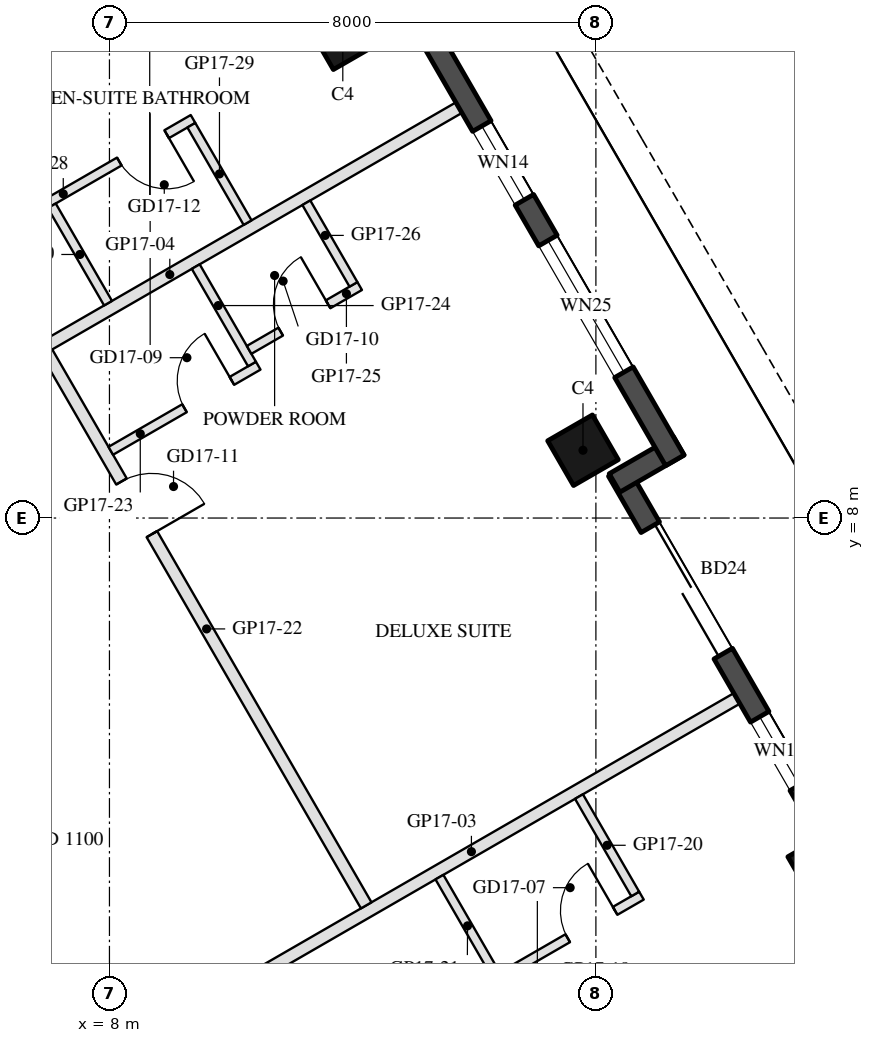
"""IFC4 building model, lengths in metres.
Left out: names, types, materials, properties, quantities, classifications, styles, units other than length and angle.
Written with IfcOpenShell. Run it as: python <this file> out.ifc"""

import sys

from ifc_helpers import new_model, si_unit, direction, frame, frame_2d, origin, origin_2d, place, context, subcontext, project, spatial, rectangle, hollow_rectangle, extrude, element, fill, save


model = new_model("IFC4")
c1 = context("Model", 3, precision=1e-05, world=origin(), true_north=direction((0.0, 1.0)))
c2 = subcontext(c1, "Body", "Model", "MODEL_VIEW")
j1 = project(units=[si_unit("LENGTHUNIT", "METRE"), si_unit("PLANEANGLEUNIT", "RADIAN")], contexts=[c1])
p1 = place(None, origin())
s1 = spatial("IfcSite", under=j1, at=p1, CompositionType="ELEMENT")
p2 = place(p1, origin())
s2 = spatial("IfcBuilding", under=s1, at=p2, CompositionType="ELEMENT")
p3 = place(p2, frame((0.0, 0.0, 183.6)))
s3 = spatial("IfcBuildingStorey", under=s2, at=p3, CompositionType="ELEMENT", Elevation=183.6)
for number, where, z_axis, x_axis in (
    (1, (19.738, 2.273, 0.0), (0.0, 0.0, 1.0), (-0.5, 0.866, 0.0)),
    (2, (15.788, 9.115, 0.0), (0.0, 0.0, 1.0), (-0.5, 0.866, 0.0)),
    (3, (11.838, 15.957, 0.0), (0.0, 0.0, 1.0), (-0.5, 0.866, 0.0)),
):
    element("IfcColumn", number, at=place(p3, frame(where, z_axis=z_axis, x_axis=x_axis)), inside=s3, PredefinedType="COLUMN", context=c2, shape_type="SweptSolid", body=[
        extrude(hollow_rectangle(XDim=0.85, YDim=0.85, WallThickness=0.04, at=origin_2d()), origin(), (0.0, 0.0, 1.0), 3.7),
    ])
p4 = place(p3, frame((19.729, 2.938, 0.0), z_axis=(0.0, 0.0, 1.0), x_axis=(-0.499976430342, 0.866039011305, 0.0)))
e4 = element("IfcWall", 4, at=p4, inside=s3, PredefinedType="SOLIDWALL", context=c2, shape_type="SweptSolid", body=[
    extrude(rectangle(XDim=6.74, YDim=0.35, at=frame_2d((3.37, 0.0))), origin(), (0.0, 0.0, 1.0), 3.55),
])
p5 = place(p4, frame((0.77, 0.0, 0.3)))
e5 = element("IfcOpeningElement", 5, at=p5, cuts=e4, PredefinedType="OPENING", context=c2, shape_type="SweptSolid", body=[
    extrude(rectangle(XDim=1.3, YDim=2.65, at=frame_2d((0.65, 1.325))), frame((0.0, 0.185, 0.0), z_axis=(0.0, -1.0, 0.0), x_axis=(1.0, 0.0, 0.0)), (0.0, 0.0, 1.0), 0.37),
])
p6 = place(p4, frame((3.27, 0.0, 0.0)))
e6 = element("IfcOpeningElement", 6, at=p6, cuts=e4, PredefinedType="OPENING", context=c2, shape_type="SweptSolid", body=[
    extrude(rectangle(XDim=2.4, YDim=2.4, at=frame_2d((1.2, 1.2))), frame((0.0, 0.185, 0.0), z_axis=(0.0, -1.0, 0.0), x_axis=(1.0, 0.0, 0.0)), (0.0, 0.0, 1.0), 0.37),
])
p7 = place(p3, frame((16.306, 8.577, 0.0), z_axis=(0.0, 0.0, 1.0), x_axis=(0.866092288191, 0.499884134912, 0.0)))
e7 = element("IfcWall", 7, at=p7, inside=s3, PredefinedType="SOLIDWALL", context=c2, shape_type="SweptSolid", body=[
    extrude(rectangle(XDim=1.22, YDim=0.35, at=frame_2d((0.61, 0.0))), origin(), (0.0, 0.0, 1.0), 3.55),
])
p8 = place(p3, frame((17.299, 8.948, 0.0), z_axis=(0.0, 0.0, 1.0), x_axis=(-0.500010041276, 0.866019606374, 0.0)))
e8 = element("IfcWall", 8, at=p8, inside=s3, PredefinedType="SOLIDWALL", context=c2, shape_type="SweptSolid", body=[
    extrude(rectangle(XDim=9.7, YDim=0.35, at=frame_2d((4.85, 0.0))), origin(), (0.0, 0.0, 1.0), 3.55),
])
p9 = place(p8, frame((1.675, 0.0, 0.3)))
e9 = element("IfcOpeningElement", 9, at=p9, cuts=e8, PredefinedType="OPENING", context=c2, shape_type="SweptSolid", body=[
    extrude(rectangle(XDim=2.5, YDim=2.65, at=frame_2d((1.25, 1.325))), frame((0.0, 0.185, 0.0), z_axis=(0.0, -1.0, 0.0), x_axis=(1.0, 0.0, 0.0)), (0.0, 0.0, 1.0), 0.37),
])
p10 = place(p8, frame((4.949, 0.0, 0.3)))
e10 = element("IfcOpeningElement", 10, at=p10, cuts=e8, PredefinedType="OPENING", context=c2, shape_type="SweptSolid", body=[
    extrude(rectangle(XDim=1.4, YDim=2.65, at=frame_2d((0.7, 1.325))), frame((0.0, 0.185, 0.0), z_axis=(0.0, -1.0, 0.0), x_axis=(1.0, 0.0, 0.0)), (0.0, 0.0, 1.0), 0.37),
])
p11 = place(p3, frame((18.318, 5.033, 0.0), z_axis=(0.0, 0.0, 1.0), x_axis=(-0.866028692387, -0.49999430393, 0.0)))
e11 = element("IfcWall", 11, at=p11, inside=s3, PredefinedType="PARTITIONING", context=c2, shape_type="SweptSolid", body=[
    extrude(rectangle(XDim=10.08, YDim=0.2, at=frame_2d((5.04, 0.0))), origin(), (0.0, 0.0, 1.0), 3.06),
])
p12 = place(p3, frame((13.747, 14.75, 0.0), z_axis=(0.0, 0.0, 1.0), x_axis=(-0.866027479907, -0.499996404033, 0.0)))
e12 = element("IfcWall", 12, at=p12, inside=s3, PredefinedType="PARTITIONING", context=c2, shape_type="SweptSolid", body=[
    extrude(rectangle(XDim=10.98, YDim=0.2, at=frame_2d((5.49, 0.0))), origin(), (0.0, 0.0, 1.0), 3.06),
])
p13 = place(p3, frame((14.324, 0.389, 0.0), z_axis=(0.0, 0.0, 1.0), x_axis=(0.866034573852, 0.49998411664, 0.0)))
e13 = element("IfcWall", 13, at=p13, inside=s3, PredefinedType="PARTITIONING", context=c2, shape_type="SweptSolid", body=[
    extrude(rectangle(XDim=2.8, YDim=0.15, at=frame_2d((1.4, 0.0))), origin(), (0.0, 0.0, 1.0), 3.55),
])
p14 = place(p13, frame((1.4, 0.0, 0.0)))
e14 = element("IfcOpeningElement", 14, at=p14, cuts=e13, PredefinedType="OPENING", context=c2, shape_type="SweptSolid", body=[
    extrude(rectangle(XDim=0.9, YDim=2.1, at=frame_2d((0.45, 1.05))), frame((0.0, 0.085, 0.0), z_axis=(0.0, -1.0, 0.0), x_axis=(1.0, 0.0, 0.0)), (0.0, 0.0, 1.0), 0.17),
])
p15 = place(p3, frame((16.647, 1.817, 0.0), z_axis=(0.0, 0.0, 1.0), x_axis=(-0.500042316284, 0.866000971088, 0.0)))
e15 = element("IfcWall", 15, at=p15, inside=s3, PredefinedType="PARTITIONING", context=c2, shape_type="SweptSolid", body=[
    extrude(rectangle(XDim=1.85, YDim=0.15, at=frame_2d((0.925, 0.0))), origin(), (0.0, 0.0, 1.0), 3.55),
])
p16 = place(p3, frame((14.352, 0.492, 0.0), z_axis=(0.0, 0.0, 1.0), x_axis=(-0.499886193382, 0.866091100096, 0.0)))
e16 = element("IfcWall", 16, at=p16, inside=s3, PredefinedType="PARTITIONING", context=c2, shape_type="SweptSolid", body=[
    extrude(rectangle(XDim=1.85, YDim=0.15, at=frame_2d((0.925, 0.0))), origin(), (0.0, 0.0, 1.0), 3.55),
])
p17 = place(p3, frame((6.973, 10.723, 0.0), z_axis=(0.0, 0.0, 1.0), x_axis=(0.500000207062, -0.866025284237, 0.0)))
e17 = element("IfcWall", 17, at=p17, inside=s3, PredefinedType="PARTITIONING", context=c2, shape_type="SweptSolid", body=[
    extrude(rectangle(XDim=10.5, YDim=0.2, at=frame_2d((5.25, 0.0))), origin(), (0.0, 0.0, 1.0), 2.95),
])
p18 = place(p17, frame((2.45, 0.0, 0.0)))
e18 = element("IfcOpeningElement", 18, at=p18, cuts=e17, PredefinedType="OPENING", context=c2, shape_type="SweptSolid", body=[
    extrude(rectangle(XDim=1.0, YDim=2.1, at=frame_2d((0.5, 1.05))), frame((0.0, 0.11, 0.0), z_axis=(0.0, -1.0, 0.0), x_axis=(1.0, 0.0, 0.0)), (0.0, 0.0, 1.0), 0.22),
])
p19 = place(p3, frame((8.022, 9.106, 0.0), z_axis=(0.0, 0.0, 1.0), x_axis=(0.866018616679, 0.500011755427, 0.0)))
e19 = element("IfcWall", 19, at=p19, inside=s3, PredefinedType="PARTITIONING", context=c2, shape_type="SweptSolid", body=[
    extrude(rectangle(XDim=2.8, YDim=0.15, at=frame_2d((1.4, 0.0))), origin(), (0.0, 0.0, 1.0), 2.95),
])
p20 = place(p19, frame((1.4, 0.0, 0.0)))
e20 = element("IfcOpeningElement", 20, at=p20, cuts=e19, PredefinedType="OPENING", context=c2, shape_type="SweptSolid", body=[
    extrude(rectangle(XDim=0.9, YDim=2.1, at=frame_2d((0.45, 1.05))), frame((0.0, 0.085, 0.0), z_axis=(0.0, -1.0, 0.0), x_axis=(1.0, 0.0, 0.0)), (0.0, 0.0, 1.0), 0.17),
])
p21 = place(p3, frame((10.344, 10.533, 0.0), z_axis=(0.0, 0.0, 1.0), x_axis=(-0.499985172903, 0.866033964044, 0.0)))
e21 = element("IfcWall", 21, at=p21, inside=s3, PredefinedType="PARTITIONING", context=c2, shape_type="SweptSolid", body=[
    extrude(rectangle(XDim=1.85, YDim=0.15, at=frame_2d((0.925, 0.0))), origin(), (0.0, 0.0, 1.0), 2.95),
])
p22 = place(p3, frame((10.297, 10.766, 0.0), z_axis=(0.0, 0.0, 1.0), x_axis=(0.866009402589, 0.500027713859, 0.0)))
e22 = element("IfcWall", 22, at=p22, inside=s3, PredefinedType="PARTITIONING", context=c2, shape_type="SweptSolid", body=[
    extrude(rectangle(XDim=2.1, YDim=0.15, at=frame_2d((1.05, 0.0))), origin(), (0.0, 0.0, 1.0), 3.55),
])
p23 = place(p22, frame((0.6, 0.0, 0.0)))
e23 = element("IfcOpeningElement", 23, at=p23, cuts=e22, PredefinedType="OPENING", context=c2, shape_type="SweptSolid", body=[
    extrude(rectangle(XDim=0.9, YDim=2.1, at=frame_2d((0.45, 1.05))), frame((0.0, 0.085, 0.0), z_axis=(0.0, -1.0, 0.0), x_axis=(1.0, 0.0, 0.0)), (0.0, 0.0, 1.0), 0.17),
])
p24 = place(p3, frame((12.013, 11.843, 0.0), z_axis=(0.0, 0.0, 1.0), x_axis=(-0.500086022567, 0.865975732936, 0.0)))
e24 = element("IfcWall", 24, at=p24, inside=s3, PredefinedType="PARTITIONING", context=c2, shape_type="SweptSolid", body=[
    extrude(rectangle(XDim=1.55, YDim=0.15, at=frame_2d((0.775, 0.0))), origin(), (0.0, 0.0, 1.0), 3.55),
])
p25 = place(p3, frame((9.374, 14.563, 0.0), z_axis=(0.0, 0.0, 1.0), x_axis=(-0.866034573852, -0.49998411664, 0.0)))
e25 = element("IfcWall", 25, at=p25, inside=s3, PredefinedType="PARTITIONING", context=c2, shape_type="SweptSolid", body=[
    extrude(rectangle(XDim=2.8, YDim=0.15, at=frame_2d((1.4, 0.0))), origin(), (0.0, 0.0, 1.0), 2.95),
])
p26 = place(p25, frame((0.5, 0.0, 0.0)))
e26 = element("IfcOpeningElement", 26, at=p26, cuts=e25, PredefinedType="OPENING", context=c2, shape_type="SweptSolid", body=[
    extrude(rectangle(XDim=0.9, YDim=2.1, at=frame_2d((0.45, 1.05))), frame((0.0, 0.085, 0.0), z_axis=(0.0, -1.0, 0.0), x_axis=(1.0, 0.0, 0.0)), (0.0, 0.0, 1.0), 0.17),
])
for number, where, z_axis, x_axis in (
    (27, (10.272, 12.859, 0.0), (0.0, 0.0, 1.0), (-0.5, 0.866, 0.0)),
    (28, (7.977, 11.534, 0.0), (0.0, 0.0, 1.0), (-0.5, 0.866, 0.0)),
):
    element("IfcWall", number, at=place(p3, frame(where, z_axis=z_axis, x_axis=x_axis)), inside=s3, PredefinedType="PARTITIONING", context=c2, shape_type="SweptSolid", body=[
        extrude(rectangle(XDim=1.85, YDim=0.15, at=frame_2d((0.925, 0.0))), origin(), (0.0, 0.0, 1.0), 2.95),
    ])
p27 = place(p5, origin())
e29 = element("IfcWindow", 29, at=p27, inside=s3, PartitioningType="SINGLE_PANEL", PredefinedType="WINDOW", context=c2, shape_type="SweptSolid", body=[
    extrude(rectangle(XDim=1.3, YDim=2.65, at=frame_2d((0.65, 1.325))), frame((0.0, 0.03, 0.0), z_axis=(0.0, -1.0, 0.0), x_axis=(1.0, 0.0, 0.0)), (0.0, 0.0, 1.0), 0.06),
])
fill(e5, e29)
p28 = place(p6, frame((2.4, 0.0, 0.0), z_axis=(0.0, 0.0, 1.0), x_axis=(-1.0, 0.0, 0.0)))
e30 = element("IfcDoor", 30, at=p28, inside=s3, OperationType="SLIDING_TO_LEFT", PredefinedType="DOOR", context=c2, shape_type="SweptSolid", body=[
    extrude(rectangle(XDim=2.4, YDim=2.4, at=frame_2d((1.2, 1.2))), frame((0.0, 0.025, 0.0), z_axis=(0.0, -1.0, 0.0), x_axis=(1.0, 0.0, 0.0)), (0.0, 0.0, 1.0), 0.05),
])
fill(e6, e30)
p29 = place(p9, origin())
e31 = element("IfcWindow", 31, at=p29, inside=s3, PartitioningType="SINGLE_PANEL", PredefinedType="WINDOW", context=c2, shape_type="SweptSolid", body=[
    extrude(rectangle(XDim=2.5, YDim=2.65, at=frame_2d((1.25, 1.325))), frame((0.0, 0.03, 0.0), z_axis=(0.0, -1.0, 0.0), x_axis=(1.0, 0.0, 0.0)), (0.0, 0.0, 1.0), 0.06),
])
fill(e9, e31)
p30 = place(p10, origin())
e32 = element("IfcWindow", 32, at=p30, inside=s3, PartitioningType="SINGLE_PANEL", PredefinedType="WINDOW", context=c2, shape_type="SweptSolid", body=[
    extrude(rectangle(XDim=1.4, YDim=2.65, at=frame_2d((0.7, 1.325))), frame((0.0, 0.03, 0.0), z_axis=(0.0, -1.0, 0.0), x_axis=(1.0, 0.0, 0.0)), (0.0, 0.0, 1.0), 0.06),
])
fill(e10, e32)
p31 = place(p14, origin())
e33 = element("IfcDoor", 33, at=p31, inside=s3, OperationType="SINGLE_SWING_RIGHT", PredefinedType="DOOR", context=c2, shape_type="SweptSolid", body=[
    extrude(rectangle(XDim=0.9, YDim=2.1, at=frame_2d((0.45, 1.05))), frame((0.0, 0.025, 0.0), z_axis=(0.0, -1.0, 0.0), x_axis=(1.0, 0.0, 0.0)), (0.0, 0.0, 1.0), 0.05),
])
fill(e14, e33)
p32 = place(p20, origin())
e34 = element("IfcDoor", 34, at=p32, inside=s3, OperationType="SINGLE_SWING_RIGHT", PredefinedType="DOOR", context=c2, shape_type="SweptSolid", body=[
    extrude(rectangle(XDim=0.9, YDim=2.1, at=frame_2d((0.45, 1.05))), frame((0.0, 0.025, 0.0), z_axis=(0.0, -1.0, 0.0), x_axis=(1.0, 0.0, 0.0)), (0.0, 0.0, 1.0), 0.05),
])
fill(e20, e34)
p33 = place(p23, origin())
e35 = element("IfcDoor", 35, at=p33, inside=s3, OperationType="SINGLE_SWING_RIGHT", PredefinedType="DOOR", context=c2, shape_type="SweptSolid", body=[
    extrude(rectangle(XDim=0.9, YDim=2.1, at=frame_2d((0.45, 1.05))), frame((0.0, 0.025, 0.0), z_axis=(0.0, -1.0, 0.0), x_axis=(1.0, 0.0, 0.0)), (0.0, 0.0, 1.0), 0.05),
])
fill(e23, e35)
p34 = place(p18, origin())
e36 = element("IfcDoor", 36, at=p34, inside=s3, OperationType="SINGLE_SWING_RIGHT", PredefinedType="DOOR", context=c2, shape_type="SweptSolid", body=[
    extrude(rectangle(XDim=1.0, YDim=2.1, at=frame_2d((0.5, 1.05))), frame((0.0, 0.025, 0.0), z_axis=(0.0, -1.0, 0.0), x_axis=(1.0, 0.0, 0.0)), (0.0, 0.0, 1.0), 0.05),
])
fill(e18, e36)
p35 = place(p26, origin())
e37 = element("IfcDoor", 37, at=p35, inside=s3, OperationType="SINGLE_SWING_LEFT", PredefinedType="DOOR", context=c2, shape_type="SweptSolid", body=[
    extrude(rectangle(XDim=0.9, YDim=2.1, at=frame_2d((0.45, 1.05))), frame((0.0, 0.025, 0.0), z_axis=(0.0, -1.0, 0.0), x_axis=(1.0, 0.0, 0.0)), (0.0, 0.0, 1.0), 0.05),
])
fill(e26, e37)
save(model, sys.argv[1])
